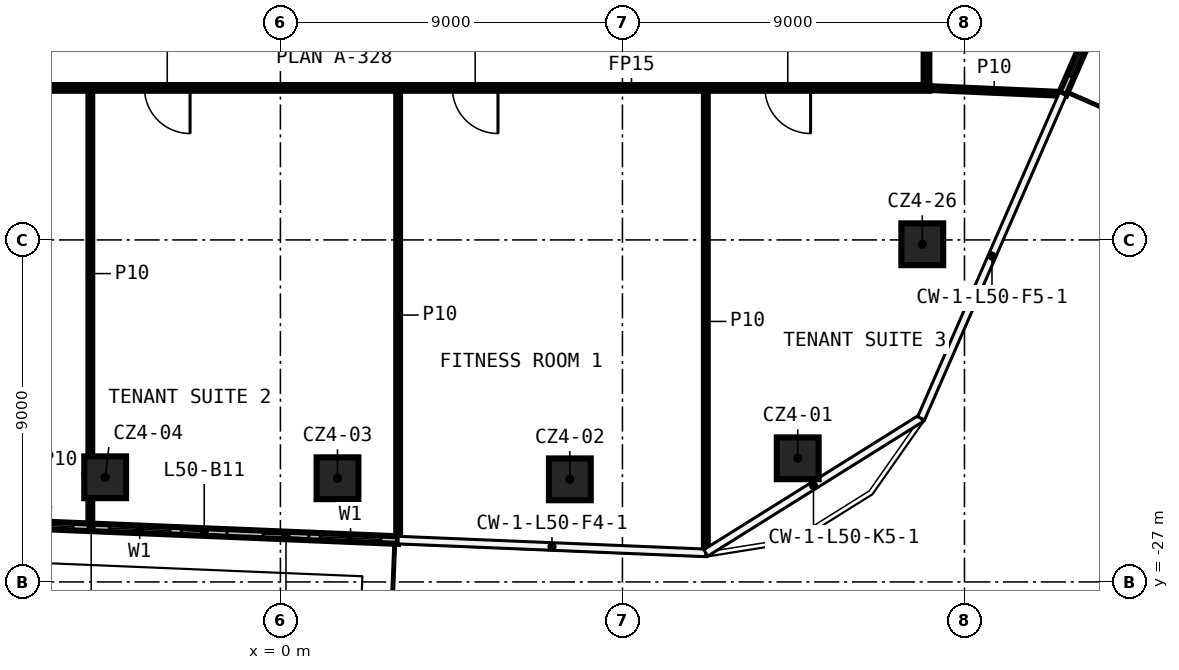
"""IFC4 building model, lengths in metres.
Left out: names, types, materials, properties, quantities, classifications, styles, units other than length and angle.
Written with IfcOpenShell. Run it as: python <this file> out.ifc"""

import sys

from ifc_helpers import new_model, si_unit, direction, frame, frame_2d, origin, origin_2d, place, context, subcontext, project, spatial, rectangle, extrude, element, fill, save


model = new_model("IFC4")
c1 = context("Model", 3, precision=1e-05, world=origin(), true_north=direction((0.0, 1.0)))
c2 = subcontext(c1, "Body", "Model", "MODEL_VIEW")
j1 = project(units=[si_unit("LENGTHUNIT", "METRE"), si_unit("PLANEANGLEUNIT", "RADIAN")], contexts=[c1])
p1 = place(None, origin())
s1 = spatial("IfcSite", under=j1, at=p1, CompositionType="ELEMENT")
p2 = place(p1, origin())
s2 = spatial("IfcBuilding", under=s1, at=p2, CompositionType="ELEMENT")
p3 = place(p2, frame((0.0, 0.0, 241.2)))
s3 = spatial("IfcBuildingStorey", under=s2, at=p3, CompositionType="ELEMENT", Elevation=241.2)
for number, where, z_axis, x_axis in (
    (1, (13.612, -23.746, 0.0), (0.0, 0.0, 1.0), (1.0, 0.0, 0.0)),
    (2, (7.616, -24.3, 0.0), (0.0, 0.0, 1.0), (1.0, 0.0, 0.0)),
    (3, (1.502, -24.272, 0.0), (0.0, 0.0, 1.0), (1.0, 0.0, 0.0)),
    (4, (-4.611, -24.246, 0.0), (0.0, 0.0, 1.0), (1.0, 0.0, 0.0)),
    (5, (16.89, -18.114, 0.0), (0.0, 0.0, 1.0), (1.0, 0.0, 0.0)),
):
    element("IfcColumn", number, at=place(p3, frame(where, z_axis=z_axis, x_axis=x_axis)), inside=s3, PredefinedType="COLUMN", context=c2, shape_type="SweptSolid", body=[
        extrude(rectangle(XDim=1.1, YDim=1.1, at=origin_2d()), origin(), (0.0, 0.0, 1.0), 3.82),
    ])
p4 = place(p3, frame((17.075, -14.0, 0.0), z_axis=(0.0, 0.0, 1.0), x_axis=(-1.0, 0.0, 0.0)))
e6 = element("IfcWall", 6, at=p4, inside=s3, PredefinedType="PARTITIONING", context=c2, shape_type="SweptSolid", body=[
    extrude(rectangle(XDim=26.15, YDim=0.15, at=frame_2d((13.075, 0.0))), origin(), (0.0, 0.0, 1.0), 3.82),
])
p5 = place(p4, frame((23.476, 0.0, 0.0)))
e7 = element("IfcOpeningElement", 7, at=p5, cuts=e6, PredefinedType="OPENING", context=c2, shape_type="SweptSolid", body=[
    extrude(rectangle(XDim=1.2, YDim=2.1, at=frame_2d((0.6, 1.05))), frame((0.0, 0.085, 0.0), z_axis=(0.0, -1.0, 0.0), x_axis=(1.0, 0.0, 0.0)), (0.0, 0.0, 1.0), 0.17),
])
p6 = place(p4, frame((19.452, 0.0, 0.0)))
e8 = element("IfcOpeningElement", 8, at=p6, cuts=e6, PredefinedType="OPENING", context=c2, shape_type="SweptSolid", body=[
    extrude(rectangle(XDim=1.2, YDim=2.1, at=frame_2d((0.6, 1.05))), frame((0.0, 0.085, 0.0), z_axis=(0.0, -1.0, 0.0), x_axis=(1.0, 0.0, 0.0)), (0.0, 0.0, 1.0), 0.17),
])
p7 = place(p4, frame((11.351, 0.0, 0.0)))
e9 = element("IfcOpeningElement", 9, at=p7, cuts=e6, PredefinedType="OPENING", context=c2, shape_type="SweptSolid", body=[
    extrude(rectangle(XDim=1.2, YDim=2.1, at=frame_2d((0.6, 1.05))), frame((0.0, 0.085, 0.0), z_axis=(0.0, -1.0, 0.0), x_axis=(1.0, 0.0, 0.0)), (0.0, 0.0, 1.0), 0.17),
])
p8 = place(p4, frame((3.125, 0.0, 0.0)))
e10 = element("IfcOpeningElement", 10, at=p8, cuts=e6, PredefinedType="OPENING", context=c2, shape_type="SweptSolid", body=[
    extrude(rectangle(XDim=1.2, YDim=2.1, at=frame_2d((0.6, 1.05))), frame((0.0, 0.085, 0.0), z_axis=(0.0, -1.0, 0.0), x_axis=(1.0, 0.0, 0.0)), (0.0, 0.0, 1.0), 0.17),
])
p9 = place(p3, frame((17.0, 13.925, 0.0), z_axis=(0.0, 0.0, 1.0), x_axis=(0.0, -1.0, 0.0)))
e11 = element("IfcWall", 11, at=p9, inside=s3, PredefinedType="PARTITIONING", context=c2, shape_type="SweptSolid", body=[
    extrude(rectangle(XDim=27.85, YDim=0.15, at=frame_2d((13.925, 0.0))), origin(), (0.0, 0.0, 1.0), 3.82),
])
p10 = place(p9, frame((16.802, 0.0, 0.0)))
e12 = element("IfcOpeningElement", 12, at=p10, cuts=e11, PredefinedType="OPENING", context=c2, shape_type="SweptSolid", body=[
    extrude(rectangle(XDim=1.2, YDim=2.1, at=frame_2d((0.6, 1.05))), frame((0.0, 0.085, 0.0), z_axis=(0.0, -1.0, 0.0), x_axis=(1.0, 0.0, 0.0)), (0.0, 0.0, 1.0), 0.17),
])
p11 = place(p9, frame((12.534, 0.0, 0.0)))
e13 = element("IfcOpeningElement", 13, at=p11, cuts=e11, PredefinedType="OPENING", context=c2, shape_type="SweptSolid", body=[
    extrude(rectangle(XDim=1.2, YDim=2.1, at=frame_2d((0.6, 1.05))), frame((0.0, 0.085, 0.0), z_axis=(0.0, -1.0, 0.0), x_axis=(1.0, 0.0, 0.0)), (0.0, 0.0, 1.0), 0.17),
])
p12 = place(p3, frame((11.194, -26.215, 0.0), z_axis=(0.0, 0.0, 1.0), x_axis=(0.0, 1.0, 0.0)))
e14 = element("IfcWall", 14, at=p12, inside=s3, PredefinedType="PARTITIONING", context=c2, shape_type="SweptSolid", body=[
    extrude(rectangle(XDim=12.14, YDim=0.1, at=frame_2d((6.07, 0.0))), origin(), (0.0, 0.0, 1.0), 3.82),
])
p13 = place(p3, frame((3.098, -25.879, 0.0), z_axis=(0.0, 0.0, 1.0), x_axis=(0.0, 1.0, 0.0)))
e15 = element("IfcWall", 15, at=p13, inside=s3, PredefinedType="PARTITIONING", context=c2, shape_type="SweptSolid", body=[
    extrude(rectangle(XDim=11.804, YDim=0.1, at=frame_2d((5.902, 0.0))), origin(), (0.0, 0.0, 1.0), 3.82),
])
p14 = place(p3, frame((-5.002, -25.543, 0.0), z_axis=(0.0, 0.0, 1.0), x_axis=(0.0, 1.0, 0.0)))
e16 = element("IfcWall", 16, at=p14, inside=s3, PredefinedType="PARTITIONING", context=c2, shape_type="SweptSolid", body=[
    extrude(rectangle(XDim=0.747, YDim=0.1, at=frame_2d((0.374, 0.0))), origin(), (0.0, 0.0, 1.0), 3.82),
])
p15 = place(p3, frame((-5.002, -23.696, 0.0), z_axis=(0.0, 0.0, 1.0), x_axis=(0.0, 1.0, 0.0)))
e17 = element("IfcWall", 17, at=p15, inside=s3, PredefinedType="PARTITIONING", context=c2, shape_type="SweptSolid", body=[
    extrude(rectangle(XDim=9.621, YDim=0.1, at=frame_2d((4.811, 0.0))), origin(), (0.0, 0.0, 1.0), 3.82),
])
p16 = place(p3, frame((17.0, -14.0, 0.0), z_axis=(0.0, 0.0, 1.0), x_axis=(0.99903279054, -0.043971393272, 0.0)))
e18 = element("IfcWall", 18, at=p16, inside=s3, PredefinedType="PARTITIONING", context=c2, shape_type="SweptSolid", body=[
    extrude(rectangle(XDim=3.57, YDim=0.1, at=frame_2d((1.785, 0.0))), origin(), (0.0, 0.0, 1.0), 3.82),
])
p17 = place(p3, frame((-9.052, -25.395, 0.0), z_axis=(0.0, 0.0, 1.0), x_axis=(0.999139463312, -0.041476895419, 0.0)))
e19 = element("IfcWall", 19, at=p17, inside=s3, PredefinedType="SOLIDWALL", context=c2, shape_type="SweptSolid", body=[
    extrude(rectangle(XDim=12.161, YDim=0.2, at=frame_2d((6.081, 0.0))), origin(), (0.0, 0.0, 1.0), 3.82),
])
p18 = place(p17, frame((2.0, 0.0, 0.6)))
e20 = element("IfcOpeningElement", 20, at=p18, cuts=e19, PredefinedType="OPENING", context=c2, shape_type="SweptSolid", body=[
    extrude(rectangle(XDim=1.6, YDim=2.4, at=frame_2d((0.8, 1.2))), frame((0.0, 0.11, 0.0), z_axis=(0.0, -1.0, 0.0), x_axis=(1.0, 0.0, 0.0)), (0.0, 0.0, 1.0), 0.22),
])
p19 = place(p17, frame((0.5, 0.0, 0.0)))
e21 = element("IfcOpeningElement", 21, at=p19, cuts=e19, PredefinedType="OPENING", context=c2, shape_type="SweptSolid", body=[
    extrude(rectangle(XDim=1.2, YDim=2.4, at=frame_2d((0.6, 1.2))), frame((0.0, 0.11, 0.0), z_axis=(0.0, -1.0, 0.0), x_axis=(1.0, 0.0, 0.0)), (0.0, 0.0, 1.0), 0.22),
])
p20 = place(p17, frame((4.554, 0.0, 0.6)))
e22 = element("IfcOpeningElement", 22, at=p20, cuts=e19, PredefinedType="OPENING", context=c2, shape_type="SweptSolid", body=[
    extrude(rectangle(XDim=1.6, YDim=2.4, at=frame_2d((0.8, 1.2))), frame((0.0, 0.11, 0.0), z_axis=(0.0, -1.0, 0.0), x_axis=(1.0, 0.0, 0.0)), (0.0, 0.0, 1.0), 0.22),
])
p21 = place(p17, frame((6.454, 0.0, 0.0)))
e23 = element("IfcOpeningElement", 23, at=p21, cuts=e19, PredefinedType="OPENING", context=c2, shape_type="SweptSolid", body=[
    extrude(rectangle(XDim=1.2, YDim=2.4, at=frame_2d((0.6, 1.2))), frame((0.0, 0.11, 0.0), z_axis=(0.0, -1.0, 0.0), x_axis=(1.0, 0.0, 0.0)), (0.0, 0.0, 1.0), 0.22),
])
p22 = place(p17, frame((10.107, 0.0, 0.6)))
e24 = element("IfcOpeningElement", 24, at=p22, cuts=e19, PredefinedType="OPENING", context=c2, shape_type="SweptSolid", body=[
    extrude(rectangle(XDim=1.6, YDim=2.4, at=frame_2d((0.8, 1.2))), frame((0.0, 0.11, 0.0), z_axis=(0.0, -1.0, 0.0), x_axis=(1.0, 0.0, 0.0)), (0.0, 0.0, 1.0), 0.22),
])
p23 = place(p17, frame((8.607, 0.0, 0.0)))
e25 = element("IfcOpeningElement", 25, at=p23, cuts=e19, PredefinedType="OPENING", context=c2, shape_type="SweptSolid", body=[
    extrude(rectangle(XDim=1.2, YDim=2.4, at=frame_2d((0.6, 1.2))), frame((0.0, 0.11, 0.0), z_axis=(0.0, -1.0, 0.0), x_axis=(1.0, 0.0, 0.0)), (0.0, 0.0, 1.0), 0.22),
])
p24 = place(p3, frame((20.588, -14.158, 0.0), z_axis=(0.0, 0.0, 1.0), x_axis=(0.400286749381, 0.916389937892, 0.0)))
e26 = element("IfcWall", 26, at=p24, inside=s3, PredefinedType="SOLIDWALL", context=c2, shape_type="SweptSolid", body=[
    extrude(rectangle(XDim=13.987, YDim=0.2, at=frame_2d((6.993, 0.0))), origin(), (0.0, 0.0, 1.0), 3.82),
])
p25 = place(p24, frame((0.5, 0.0, 0.6)))
e27 = element("IfcOpeningElement", 27, at=p25, cuts=e26, PredefinedType="OPENING", context=c2, shape_type="SweptSolid", body=[
    extrude(rectangle(XDim=1.6, YDim=2.4, at=frame_2d((0.8, 1.2))), frame((0.0, 0.11, 0.0), z_axis=(0.0, -1.0, 0.0), x_axis=(1.0, 0.0, 0.0)), (0.0, 0.0, 1.0), 0.22),
])
p26 = place(p24, frame((2.4, 0.0, 0.0)))
e28 = element("IfcOpeningElement", 28, at=p26, cuts=e26, PredefinedType="OPENING", context=c2, shape_type="SweptSolid", body=[
    extrude(rectangle(XDim=1.2, YDim=2.4, at=frame_2d((0.6, 1.2))), frame((0.0, 0.11, 0.0), z_axis=(0.0, -1.0, 0.0), x_axis=(1.0, 0.0, 0.0)), (0.0, 0.0, 1.0), 0.22),
])
p27 = place(p24, frame((6.662, 0.0, 0.6)))
e29 = element("IfcOpeningElement", 29, at=p27, cuts=e26, PredefinedType="OPENING", context=c2, shape_type="SweptSolid", body=[
    extrude(rectangle(XDim=1.6, YDim=2.4, at=frame_2d((0.8, 1.2))), frame((0.0, 0.11, 0.0), z_axis=(0.0, -1.0, 0.0), x_axis=(1.0, 0.0, 0.0)), (0.0, 0.0, 1.0), 0.22),
])
p28 = place(p24, frame((5.162, 0.0, 0.0)))
e30 = element("IfcOpeningElement", 30, at=p28, cuts=e26, PredefinedType="OPENING", context=c2, shape_type="SweptSolid", body=[
    extrude(rectangle(XDim=1.2, YDim=2.4, at=frame_2d((0.6, 1.2))), frame((0.0, 0.11, 0.0), z_axis=(0.0, -1.0, 0.0), x_axis=(1.0, 0.0, 0.0)), (0.0, 0.0, 1.0), 0.22),
])
p29 = place(p24, frame((11.324, 0.0, 0.6)))
e31 = element("IfcOpeningElement", 31, at=p29, cuts=e26, PredefinedType="OPENING", context=c2, shape_type="SweptSolid", body=[
    extrude(rectangle(XDim=1.6, YDim=2.4, at=frame_2d((0.8, 1.2))), frame((0.0, 0.11, 0.0), z_axis=(0.0, -1.0, 0.0), x_axis=(1.0, 0.0, 0.0)), (0.0, 0.0, 1.0), 0.22),
])
p30 = place(p24, frame((9.824, 0.0, 0.0)))
e32 = element("IfcOpeningElement", 32, at=p30, cuts=e26, PredefinedType="OPENING", context=c2, shape_type="SweptSolid", body=[
    extrude(rectangle(XDim=1.2, YDim=2.4, at=frame_2d((0.6, 1.2))), frame((0.0, 0.11, 0.0), z_axis=(0.0, -1.0, 0.0), x_axis=(1.0, 0.0, 0.0)), (0.0, 0.0, 1.0), 0.22),
])
p31 = place(p6, origin())
e33 = element("IfcDoor", 33, at=p31, inside=s3, OperationType="SINGLE_SWING_LEFT", PredefinedType="DOOR", context=c2, shape_type="SweptSolid", body=[
    extrude(rectangle(XDim=1.2, YDim=2.1, at=frame_2d((0.6, 1.05))), frame((0.0, 0.025, 0.0), z_axis=(0.0, -1.0, 0.0), x_axis=(1.0, 0.0, 0.0)), (0.0, 0.0, 1.0), 0.05),
])
fill(e8, e33)
p32 = place(p7, origin())
e34 = element("IfcDoor", 34, at=p32, inside=s3, OperationType="SINGLE_SWING_RIGHT", PredefinedType="DOOR", context=c2, shape_type="SweptSolid", body=[
    extrude(rectangle(XDim=1.2, YDim=2.1, at=frame_2d((0.6, 1.05))), frame((0.0, 0.025, 0.0), z_axis=(0.0, -1.0, 0.0), x_axis=(1.0, 0.0, 0.0)), (0.0, 0.0, 1.0), 0.05),
])
fill(e9, e34)
p33 = place(p8, origin())
e35 = element("IfcDoor", 35, at=p33, inside=s3, OperationType="SINGLE_SWING_LEFT", PredefinedType="DOOR", context=c2, shape_type="SweptSolid", body=[
    extrude(rectangle(XDim=1.2, YDim=2.1, at=frame_2d((0.6, 1.05))), frame((0.0, 0.025, 0.0), z_axis=(0.0, -1.0, 0.0), x_axis=(1.0, 0.0, 0.0)), (0.0, 0.0, 1.0), 0.05),
])
fill(e10, e35)
p34 = place(p18, origin())
e36 = element("IfcWindow", 36, at=p34, inside=s3, PartitioningType="SINGLE_PANEL", PredefinedType="WINDOW", context=c2, shape_type="SweptSolid", body=[
    extrude(rectangle(XDim=1.6, YDim=2.4, at=frame_2d((0.8, 1.2))), frame((0.0, 0.03, 0.0), z_axis=(0.0, -1.0, 0.0), x_axis=(1.0, 0.0, 0.0)), (0.0, 0.0, 1.0), 0.06),
])
fill(e20, e36)
p35 = place(p20, origin())
e37 = element("IfcWindow", 37, at=p35, inside=s3, PartitioningType="SINGLE_PANEL", PredefinedType="WINDOW", context=c2, shape_type="SweptSolid", body=[
    extrude(rectangle(XDim=1.6, YDim=2.4, at=frame_2d((0.8, 1.2))), frame((0.0, 0.03, 0.0), z_axis=(0.0, -1.0, 0.0), x_axis=(1.0, 0.0, 0.0)), (0.0, 0.0, 1.0), 0.06),
])
fill(e22, e37)
p36 = place(p21, origin())
e38 = element("IfcDoor", 38, at=p36, inside=s3, OperationType="SLIDING_TO_LEFT", PredefinedType="DOOR", context=c2, shape_type="SweptSolid", body=[
    extrude(rectangle(XDim=1.2, YDim=2.4, at=frame_2d((0.6, 1.2))), frame((0.0, 0.025, 0.0), z_axis=(0.0, -1.0, 0.0), x_axis=(1.0, 0.0, 0.0)), (0.0, 0.0, 1.0), 0.05),
])
fill(e23, e38)
p37 = place(p22, origin())
e39 = element("IfcWindow", 39, at=p37, inside=s3, PartitioningType="SINGLE_PANEL", PredefinedType="WINDOW", context=c2, shape_type="SweptSolid", body=[
    extrude(rectangle(XDim=1.6, YDim=2.4, at=frame_2d((0.8, 1.2))), frame((0.0, 0.03, 0.0), z_axis=(0.0, -1.0, 0.0), x_axis=(1.0, 0.0, 0.0)), (0.0, 0.0, 1.0), 0.06),
])
fill(e24, e39)
p38 = place(p23, origin())
e40 = element("IfcDoor", 40, at=p38, inside=s3, OperationType="SLIDING_TO_LEFT", PredefinedType="DOOR", context=c2, shape_type="SweptSolid", body=[
    extrude(rectangle(XDim=1.2, YDim=2.4, at=frame_2d((0.6, 1.2))), frame((0.0, 0.025, 0.0), z_axis=(0.0, -1.0, 0.0), x_axis=(1.0, 0.0, 0.0)), (0.0, 0.0, 1.0), 0.05),
])
fill(e25, e40)
p39 = place(p25, origin())
e41 = element("IfcWindow", 41, at=p39, inside=s3, PartitioningType="SINGLE_PANEL", PredefinedType="WINDOW", context=c2, shape_type="SweptSolid", body=[
    extrude(rectangle(XDim=1.6, YDim=2.4, at=frame_2d((0.8, 1.2))), frame((0.0, 0.03, 0.0), z_axis=(0.0, -1.0, 0.0), x_axis=(1.0, 0.0, 0.0)), (0.0, 0.0, 1.0), 0.06),
])
fill(e27, e41)
save(model, sys.argv[1])
